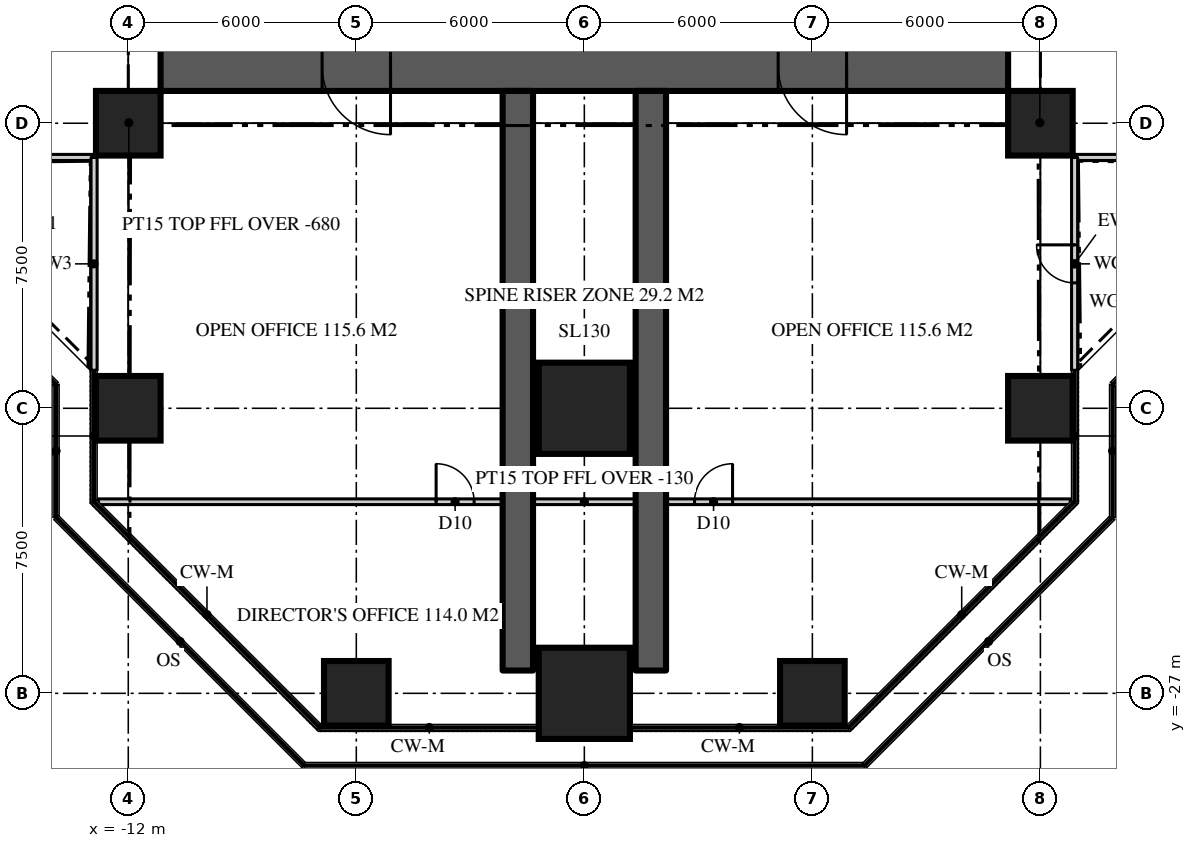
"""IFC4 building model, lengths in metres.
Left out: names, types, materials, properties, quantities, classifications, styles, units other than length and angle.
Written with IfcOpenShell. Run it as: python <this file> out.ifc"""

import sys

from ifc_helpers import new_model, si_unit, direction, frame, frame_2d, origin, origin_2d, place, context, subcontext, project, spatial, rectangle, extrude, element, fill, save


model = new_model("IFC4")
c1 = context("Model", 3, precision=1e-05, world=origin(), true_north=direction((0.0, 1.0)))
c2 = subcontext(c1, "Body", "Model", "MODEL_VIEW")
j1 = project(units=[si_unit("LENGTHUNIT", "METRE"), si_unit("PLANEANGLEUNIT", "RADIAN")], contexts=[c1])
p1 = place(None, origin())
s1 = spatial("IfcSite", under=j1, at=p1, CompositionType="ELEMENT")
p2 = place(p1, origin())
s2 = spatial("IfcBuilding", under=s1, at=p2, CompositionType="ELEMENT")
p3 = place(p2, frame((0.0, 0.0, 178.8)))
s3 = spatial("IfcBuildingStorey", under=s2, at=p3, CompositionType="ELEMENT", Elevation=178.8)
p4 = place(p3, frame((11.15, -10.5, 0.0), z_axis=(0.0, 0.0, 1.0), x_axis=(-1.0, 0.0, 0.0)))
e1 = element("IfcWall", 1, at=p4, inside=s3, PredefinedType="SHEAR", context=c2, shape_type="SweptSolid", body=[
    extrude(rectangle(XDim=22.3, YDim=1.3, at=frame_2d((11.15, 0.0))), origin(), (0.0, 0.0, 1.0), 3.9),
])
p5 = place(p4, frame((16.25, 0.0, 0.0)))
e2 = element("IfcOpeningElement", 2, at=p5, cuts=e1, PredefinedType="OPENING", context=c2, shape_type="SweptSolid", body=[
    extrude(rectangle(XDim=1.8, YDim=2.2, at=frame_2d((0.9, 1.1))), frame((0.0, 0.66, 0.0), z_axis=(0.0, -1.0, 0.0), x_axis=(1.0, 0.0, 0.0)), (0.0, 0.0, 1.0), 1.32),
])
p6 = place(p4, frame((4.25, 0.0, 0.0)))
e3 = element("IfcOpeningElement", 3, at=p6, cuts=e1, PredefinedType="OPENING", context=c2, shape_type="SweptSolid", body=[
    extrude(rectangle(XDim=1.8, YDim=2.2, at=frame_2d((0.9, 1.1))), frame((0.0, 0.66, 0.0), z_axis=(0.0, -1.0, 0.0), x_axis=(1.0, 0.0, 0.0)), (0.0, 0.0, 1.0), 1.32),
])
for number, where, z_axis, x_axis in (
    (4, (-1.75, -11.15, 0.0), (0.0, 0.0, 1.0), (0.0, -1.0, 0.0)),
    (5, (1.75, -11.15, 0.0), (0.0, 0.0, 1.0), (0.0, -1.0, 0.0)),
):
    element("IfcWall", number, at=place(p3, frame(where, z_axis=z_axis, x_axis=x_axis)), inside=s3, PredefinedType="SHEAR", context=c2, shape_type="SweptSolid", body=[
        extrude(rectangle(XDim=15.25, YDim=0.8, at=frame_2d((7.625, 0.0))), origin(), (0.0, 0.0, 1.0), 3.9),
    ])
p7 = place(p3, frame((-6.0, -27.0, 0.0), z_axis=(0.0, 0.0, 1.0), x_axis=(1.0, 0.0, 0.0)))
e6 = element("IfcColumn", 6, at=p7, inside=s3, PredefinedType="COLUMN", context=c2, shape_type="SweptSolid", body=[
    extrude(rectangle(XDim=1.7, YDim=1.7, at=origin_2d()), origin(), (0.0, 0.0, 1.0), 3.9),
])
p8 = place(p3, frame((0.0, -27.0, 0.0), z_axis=(0.0, 0.0, 1.0), x_axis=(1.0, 0.0, 0.0)))
e7 = element("IfcColumn", 7, at=p8, inside=s3, PredefinedType="COLUMN", context=c2, shape_type="SweptSolid", body=[
    extrude(rectangle(XDim=2.4, YDim=2.4, at=origin_2d()), origin(), (0.0, 0.0, 1.0), 3.9),
])
for number, where, z_axis, x_axis in (
    (8, (6.0, -27.0, 0.0), (0.0, 0.0, 1.0), (1.0, 0.0, 0.0)),
    (9, (-12.0, -19.5, 0.0), (0.0, 0.0, 1.0), (1.0, 0.0, 0.0)),
):
    element("IfcColumn", number, at=place(p3, frame(where, z_axis=z_axis, x_axis=x_axis)), inside=s3, PredefinedType="COLUMN", context=c2, shape_type="SweptSolid", body=[
        extrude(rectangle(XDim=1.7, YDim=1.7, at=origin_2d()), origin(), (0.0, 0.0, 1.0), 3.9),
    ])
p9 = place(p3, frame((0.0, -19.5, 0.0), z_axis=(0.0, 0.0, 1.0), x_axis=(1.0, 0.0, 0.0)))
e10 = element("IfcColumn", 10, at=p9, inside=s3, PredefinedType="COLUMN", context=c2, shape_type="SweptSolid", body=[
    extrude(rectangle(XDim=2.4, YDim=2.4, at=origin_2d()), origin(), (0.0, 0.0, 1.0), 3.9),
])
for number, where, z_axis, x_axis in (
    (11, (12.0, -19.5, 0.0), (0.0, 0.0, 1.0), (1.0, 0.0, 0.0)),
    (12, (-12.0, -12.0, 0.0), (0.0, 0.0, 1.0), (1.0, 0.0, 0.0)),
    (13, (12.0, -12.0, 0.0), (0.0, 0.0, 1.0), (1.0, 0.0, 0.0)),
):
    element("IfcColumn", number, at=place(p3, frame(where, z_axis=z_axis, x_axis=x_axis)), inside=s3, PredefinedType="COLUMN", context=c2, shape_type="SweptSolid", body=[
        extrude(rectangle(XDim=1.7, YDim=1.7, at=origin_2d()), origin(), (0.0, 0.0, 1.0), 3.9),
    ])
p10 = place(p3, frame((12.9, -12.9, 0.0), z_axis=(0.0, 0.0, 1.0), x_axis=(1.0, 0.0, 0.0)))
e14 = element("IfcWall", 14, at=p10, inside=s3, PredefinedType="SOLIDWALL", context=c2, shape_type="SweptSolid", body=[
    extrude(rectangle(XDim=5.6, YDim=0.16, at=frame_2d((2.8, 0.0))), origin(), (0.0, 0.0, 1.0), 3.77),
])
p11 = place(p3, frame((-18.5, -12.9, 0.0), z_axis=(0.0, 0.0, 1.0), x_axis=(1.0, 0.0, 0.0)))
e15 = element("IfcWall", 15, at=p11, inside=s3, PredefinedType="SOLIDWALL", context=c2, shape_type="SweptSolid", body=[
    extrude(rectangle(XDim=5.6, YDim=0.16, at=frame_2d((2.8, 0.0))), origin(), (0.0, 0.0, 1.0), 3.77),
])
p12 = place(p11, frame((2.3, 0.0, 0.0)))
e16 = element("IfcOpeningElement", 16, at=p12, cuts=e15, PredefinedType="OPENING", context=c2, shape_type="SweptSolid", body=[
    extrude(rectangle(XDim=1.0, YDim=2.2, at=frame_2d((0.5, 1.1))), frame((0.0, 0.09, 0.0), z_axis=(0.0, -1.0, 0.0), x_axis=(1.0, 0.0, 0.0)), (0.0, 0.0, 1.0), 0.18),
])
p13 = place(p3, frame((-12.9, -12.9, 0.0), z_axis=(0.0, 0.0, 1.0), x_axis=(0.0, -1.0, 0.0)))
e17 = element("IfcWall", 17, at=p13, inside=s3, PredefinedType="SOLIDWALL", context=c2, shape_type="SweptSolid", body=[
    extrude(rectangle(XDim=5.6, YDim=0.16, at=frame_2d((2.8, 0.0))), origin(), (0.0, 0.0, 1.0), 3.77),
])
p14 = place(p3, frame((12.9, -18.5, 0.0), z_axis=(0.0, 0.0, 1.0), x_axis=(0.0, 1.0, 0.0)))
e18 = element("IfcWall", 18, at=p14, inside=s3, PredefinedType="SOLIDWALL", context=c2, shape_type="SweptSolid", body=[
    extrude(rectangle(XDim=5.6, YDim=0.16, at=frame_2d((2.8, 0.0))), origin(), (0.0, 0.0, 1.0), 3.77),
])
p15 = place(p14, frame((2.3, 0.0, 0.0)))
e19 = element("IfcOpeningElement", 19, at=p15, cuts=e18, PredefinedType="OPENING", context=c2, shape_type="SweptSolid", body=[
    extrude(rectangle(XDim=1.0, YDim=2.2, at=frame_2d((0.5, 1.1))), frame((0.0, 0.09, 0.0), z_axis=(0.0, -1.0, 0.0), x_axis=(1.0, 0.0, 0.0)), (0.0, 0.0, 1.0), 0.18),
])
p16 = place(p3, frame((-12.786, -21.959, 0.0), z_axis=(0.0, 0.0, 1.0), x_axis=(1.0, 0.0, 0.0)))
e20 = element("IfcWall", 20, at=p16, inside=s3, PredefinedType="PARTITIONING", context=c2, shape_type="SweptSolid", body=[
    extrude(rectangle(XDim=25.573, YDim=0.15, at=frame_2d((12.786, 0.0))), origin(), (0.0, 0.0, 1.0), 3.77),
])
p17 = place(p16, frame((15.687, 0.0, 0.0)))
e21 = element("IfcOpeningElement", 21, at=p17, cuts=e20, PredefinedType="OPENING", context=c2, shape_type="SweptSolid", body=[
    extrude(rectangle(XDim=1.0, YDim=2.2, at=frame_2d((0.5, 1.1))), frame((0.0, 0.085, 0.0), z_axis=(0.0, -1.0, 0.0), x_axis=(1.0, 0.0, 0.0)), (0.0, 0.0, 1.0), 0.17),
])
p18 = place(p16, frame((8.886, 0.0, 0.0)))
e22 = element("IfcOpeningElement", 22, at=p18, cuts=e20, PredefinedType="OPENING", context=c2, shape_type="SweptSolid", body=[
    extrude(rectangle(XDim=1.0, YDim=2.2, at=frame_2d((0.5, 1.1))), frame((0.0, 0.085, 0.0), z_axis=(0.0, -1.0, 0.0), x_axis=(1.0, 0.0, 0.0)), (0.0, 0.0, 1.0), 0.17),
])
for number, where, z_axis, x_axis in (
    (23, (-11.15, -11.15, 0.0), (0.0, 0.0, 1.0), (-0.707, -0.707, 0.0)),
    (24, (11.15, -11.15, 0.0), (0.0, 0.0, 1.0), (0.707, -0.707, 0.0)),
):
    element("IfcWall", number, at=place(p3, frame(where, z_axis=z_axis, x_axis=x_axis)), inside=s3, PredefinedType="PARTITIONING", context=c2, shape_type="SweptSolid", body=[
        extrude(rectangle(XDim=2.362, YDim=0.15, at=frame_2d((1.181, 0.0))), origin(), (0.0, 0.0, 1.0), 3.22),
    ])
p19 = place(p15, origin())
e25 = element("IfcDoor", 25, at=p19, inside=s3, OperationType="SINGLE_SWING_RIGHT", PredefinedType="DOOR", context=c2, shape_type="SweptSolid", body=[
    extrude(rectangle(XDim=1.0, YDim=2.2, at=frame_2d((0.5, 1.1))), frame((0.0, 0.025, 0.0), z_axis=(0.0, -1.0, 0.0), x_axis=(1.0, 0.0, 0.0)), (0.0, 0.0, 1.0), 0.05),
])
fill(e19, e25)
p20 = place(p5, origin())
e26 = element("IfcDoor", 26, at=p20, inside=s3, OperationType="DOUBLE_DOOR_DOUBLE_SWING", PredefinedType="DOOR", context=c2, shape_type="SweptSolid", body=[
    extrude(rectangle(XDim=1.8, YDim=2.2, at=frame_2d((0.9, 1.1))), frame((0.0, 0.025, 0.0), z_axis=(0.0, -1.0, 0.0), x_axis=(1.0, 0.0, 0.0)), (0.0, 0.0, 1.0), 0.05),
])
fill(e2, e26)
p21 = place(p6, origin())
e27 = element("IfcDoor", 27, at=p21, inside=s3, OperationType="DOUBLE_DOOR_DOUBLE_SWING", PredefinedType="DOOR", context=c2, shape_type="SweptSolid", body=[
    extrude(rectangle(XDim=1.8, YDim=2.2, at=frame_2d((0.9, 1.1))), frame((0.0, 0.025, 0.0), z_axis=(0.0, -1.0, 0.0), x_axis=(1.0, 0.0, 0.0)), (0.0, 0.0, 1.0), 0.05),
])
fill(e3, e27)
p22 = place(p17, origin())
e28 = element("IfcDoor", 28, at=p22, inside=s3, OperationType="SINGLE_SWING_RIGHT", PredefinedType="DOOR", context=c2, shape_type="SweptSolid", body=[
    extrude(rectangle(XDim=1.0, YDim=2.2, at=frame_2d((0.5, 1.1))), frame((0.0, 0.025, 0.0), z_axis=(0.0, -1.0, 0.0), x_axis=(1.0, 0.0, 0.0)), (0.0, 0.0, 1.0), 0.05),
])
fill(e21, e28)
p23 = place(p18, origin())
e29 = element("IfcDoor", 29, at=p23, inside=s3, OperationType="SINGLE_SWING_LEFT", PredefinedType="DOOR", context=c2, shape_type="SweptSolid", body=[
    extrude(rectangle(XDim=1.0, YDim=2.2, at=frame_2d((0.5, 1.1))), frame((0.0, 0.025, 0.0), z_axis=(0.0, -1.0, 0.0), x_axis=(1.0, 0.0, 0.0)), (0.0, 0.0, 1.0), 0.05),
])
fill(e22, e29)
save(model, sys.argv[1])
